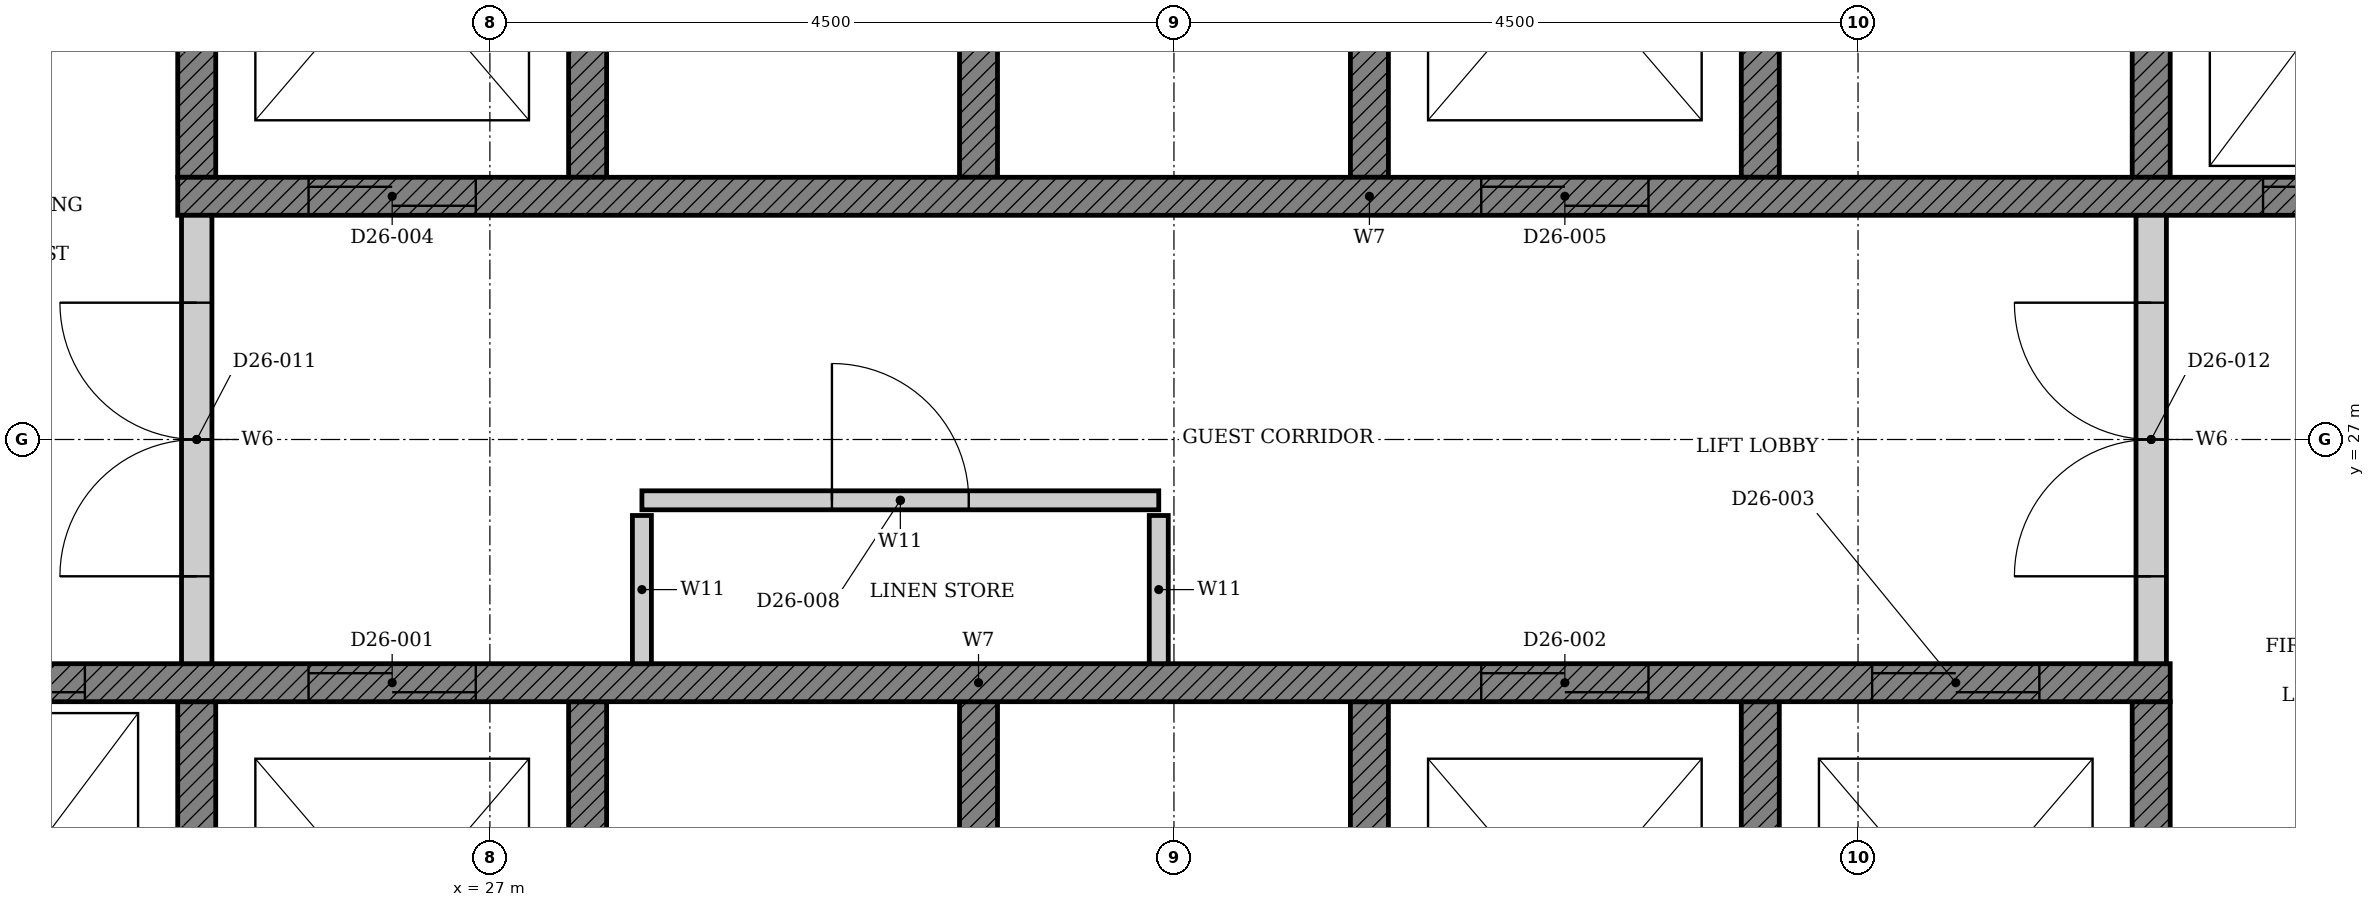
"""IFC4 building model, lengths in metres.
Left out: names, types, materials, properties, quantities, classifications, styles, units other than length and angle.
Written with IfcOpenShell. Run it as: python <this file> out.ifc"""

import sys

from ifc_helpers import new_model, si_unit, direction, frame, frame_2d, origin, place, context, subcontext, project, spatial, polyline, rectangle, outline, extrude, element, fill, save


model = new_model("IFC4")
c1 = context("Model", 3, precision=1e-05, world=origin(), true_north=direction((0.0, 1.0)))
c2 = subcontext(c1, "Body", "Model", "MODEL_VIEW")
j1 = project(units=[si_unit("LENGTHUNIT", "METRE"), si_unit("PLANEANGLEUNIT", "RADIAN")], contexts=[c1])
p1 = place(None, origin())
s1 = spatial("IfcSite", under=j1, at=p1, CompositionType="ELEMENT")
p2 = place(p1, origin())
s2 = spatial("IfcBuilding", under=s1, at=p2, CompositionType="ELEMENT")
p3 = place(p2, frame((0.0, 0.0, 108.0)))
s3 = spatial("IfcBuildingStorey", under=s2, at=p3, CompositionType="ELEMENT", Elevation=108.0)
p4 = place(p3, origin())
e1 = element("IfcWall", 1, at=p4, inside=s3, PredefinedType="SHEAR", context=c2, shape_type="SweptSolid", body=[
    extrude(outline(polyline([(22.375, 22.35), (38.053, 22.35), (38.053, 25.275), (37.803, 25.275), (37.803, 22.65), (35.482, 22.65), (35.482, 25.275), (35.232, 25.275), (35.232, 22.65), (32.911, 22.65), (32.911, 25.275), (32.661, 25.275), (32.661, 22.65), (30.339, 22.65), (30.339, 25.275), (30.089, 25.275), (30.089, 22.65), (27.768, 22.65), (27.768, 25.275), (27.518, 25.275), (27.518, 22.65), (25.197, 22.65), (25.197, 25.275), (24.947, 25.275), (24.947, 22.65), (22.625, 22.65), (22.625, 25.275), (22.375, 25.275), (22.375, 22.35)])), origin(), (0.0, 0.0, 1.0), 3.3),
])
p5 = place(p3, origin())
e2 = element("IfcWall", 2, at=p5, inside=s3, PredefinedType="SHEAR", context=c2, shape_type="SweptSolid", body=[
    extrude(outline(polyline([(24.947, 28.725), (25.197, 28.725), (25.197, 31.35), (27.518, 31.35), (27.518, 28.725), (27.768, 28.725), (27.768, 31.35), (30.089, 31.35), (30.089, 28.725), (30.339, 28.725), (30.339, 31.35), (32.661, 31.35), (32.661, 28.725), (32.911, 28.725), (32.911, 31.35), (35.232, 31.35), (35.232, 28.725), (35.482, 28.725), (35.482, 31.35), (37.803, 31.35), (37.803, 28.725), (38.053, 28.725), (38.053, 31.35), (40.375, 31.35), (40.375, 28.725), (40.625, 28.725), (40.625, 31.65), (24.947, 31.65), (24.947, 28.725)])), origin(), (0.0, 0.0, 1.0), 3.3),
])
p6 = place(p3, frame((22.375, 25.4, 0.0), z_axis=(0.0, 0.0, 1.0), x_axis=(1.0, 0.0, 0.0)))
e3 = element("IfcWall", 3, at=p6, inside=s3, PredefinedType="SHEAR", context=c2, shape_type="SweptSolid", body=[
    extrude(rectangle(XDim=15.678, YDim=0.25, at=frame_2d((7.839, 0.0))), origin(), (0.0, 0.0, 1.0), 3.3),
])
p7 = place(p6, frame((3.432, 0.0, 0.0)))
e4 = element("IfcOpeningElement", 4, at=p7, cuts=e3, PredefinedType="OPENING", context=c2, shape_type="SweptSolid", body=[
    extrude(rectangle(XDim=1.1, YDim=2.1, at=frame_2d((0.55, 1.05))), frame((0.0, 0.135, 0.0), z_axis=(0.0, -1.0, 0.0), x_axis=(1.0, 0.0, 0.0)), (0.0, 0.0, 1.0), 0.27),
])
p8 = place(p6, frame((11.146, 0.0, 0.0)))
e5 = element("IfcOpeningElement", 5, at=p8, cuts=e3, PredefinedType="OPENING", context=c2, shape_type="SweptSolid", body=[
    extrude(rectangle(XDim=1.1, YDim=2.1, at=frame_2d((0.55, 1.05))), frame((0.0, 0.135, 0.0), z_axis=(0.0, -1.0, 0.0), x_axis=(1.0, 0.0, 0.0)), (0.0, 0.0, 1.0), 0.27),
])
p9 = place(p6, frame((13.718, 0.0, 0.0)))
e6 = element("IfcOpeningElement", 6, at=p9, cuts=e3, PredefinedType="OPENING", context=c2, shape_type="SweptSolid", body=[
    extrude(rectangle(XDim=1.1, YDim=2.1, at=frame_2d((0.55, 1.05))), frame((0.0, 0.135, 0.0), z_axis=(0.0, -1.0, 0.0), x_axis=(1.0, 0.0, 0.0)), (0.0, 0.0, 1.0), 0.27),
])
p10 = place(p6, frame((0.861, 0.0, 0.0)))
e7 = element("IfcOpeningElement", 7, at=p10, cuts=e3, PredefinedType="OPENING", context=c2, shape_type="SweptSolid", body=[
    extrude(rectangle(XDim=1.1, YDim=2.1, at=frame_2d((0.55, 1.05))), frame((0.0, 0.135, 0.0), z_axis=(0.0, -1.0, 0.0), x_axis=(1.0, 0.0, 0.0)), (0.0, 0.0, 1.0), 0.27),
])
p11 = place(p3, frame((24.947, 28.6, 0.0), z_axis=(0.0, 0.0, 1.0), x_axis=(1.0, 0.0, 0.0)))
e8 = element("IfcWall", 8, at=p11, inside=s3, PredefinedType="SHEAR", context=c2, shape_type="SweptSolid", body=[
    extrude(rectangle(XDim=15.678, YDim=0.25, at=frame_2d((7.839, 0.0))), origin(), (0.0, 0.0, 1.0), 3.3),
])
p12 = place(p11, frame((0.861, 0.0, 0.0)))
e9 = element("IfcOpeningElement", 9, at=p12, cuts=e8, PredefinedType="OPENING", context=c2, shape_type="SweptSolid", body=[
    extrude(rectangle(XDim=1.1, YDim=2.1, at=frame_2d((0.55, 1.05))), frame((0.0, 0.135, 0.0), z_axis=(0.0, -1.0, 0.0), x_axis=(1.0, 0.0, 0.0)), (0.0, 0.0, 1.0), 0.27),
])
p13 = place(p11, frame((8.575, 0.0, 0.0)))
e10 = element("IfcOpeningElement", 10, at=p13, cuts=e8, PredefinedType="OPENING", context=c2, shape_type="SweptSolid", body=[
    extrude(rectangle(XDim=1.1, YDim=2.1, at=frame_2d((0.55, 1.05))), frame((0.0, 0.135, 0.0), z_axis=(0.0, -1.0, 0.0), x_axis=(1.0, 0.0, 0.0)), (0.0, 0.0, 1.0), 0.27),
])
p14 = place(p11, frame((13.718, 0.0, 0.0)))
e11 = element("IfcOpeningElement", 11, at=p14, cuts=e8, PredefinedType="OPENING", context=c2, shape_type="SweptSolid", body=[
    extrude(rectangle(XDim=1.1, YDim=2.1, at=frame_2d((0.55, 1.05))), frame((0.0, 0.135, 0.0), z_axis=(0.0, -1.0, 0.0), x_axis=(1.0, 0.0, 0.0)), (0.0, 0.0, 1.0), 0.27),
])
p15 = place(p3, frame((28.0, 26.6, 0.0), z_axis=(0.0, 0.0, 1.0), x_axis=(1.0, 0.0, 0.0)))
e12 = element("IfcWall", 12, at=p15, inside=s3, PredefinedType="PARTITIONING", context=c2, shape_type="SweptSolid", body=[
    extrude(rectangle(XDim=3.4, YDim=0.125, at=frame_2d((1.7, 0.0))), origin(), (0.0, 0.0, 1.0), 3.3),
])
p16 = place(p15, frame((1.25, 0.0, 0.0)))
e13 = element("IfcOpeningElement", 13, at=p16, cuts=e12, PredefinedType="OPENING", context=c2, shape_type="SweptSolid", body=[
    extrude(rectangle(XDim=0.9, YDim=2.1, at=frame_2d((0.45, 1.05))), frame((0.0, 0.073, 0.0), z_axis=(0.0, -1.0, 0.0), x_axis=(1.0, 0.0, 0.0)), (0.0, 0.0, 1.0), 0.145),
])
for number, where, z_axis, x_axis in (
    (14, (28.0, 25.525, 0.0), (0.0, 0.0, 1.0), (0.0, 1.0, 0.0)),
    (15, (31.4, 25.525, 0.0), (0.0, 0.0, 1.0), (0.0, 1.0, 0.0)),
):
    element("IfcWall", number, at=place(p3, frame(where, z_axis=z_axis, x_axis=x_axis)), inside=s3, PredefinedType="PARTITIONING", context=c2, shape_type="SweptSolid", body=[
        extrude(rectangle(XDim=0.975, YDim=0.125, at=frame_2d((0.488, 0.0))), origin(), (0.0, 0.0, 1.0), 3.3),
    ])
p17 = place(p3, frame((25.072, 25.525, 0.0), z_axis=(0.0, 0.0, 1.0), x_axis=(0.0, 1.0, 0.0)))
e16 = element("IfcWall", 16, at=p17, inside=s3, PredefinedType="PARTITIONING", context=c2, shape_type="SweptSolid", body=[
    extrude(rectangle(XDim=2.95, YDim=0.2, at=frame_2d((1.475, 0.0))), origin(), (0.0, 0.0, 1.0), 3.3),
])
p18 = place(p17, frame((0.575, 0.0, 0.0)))
e17 = element("IfcOpeningElement", 17, at=p18, cuts=e16, PredefinedType="OPENING", context=c2, shape_type="SweptSolid", body=[
    extrude(rectangle(XDim=1.8, YDim=2.1, at=frame_2d((0.9, 1.05))), frame((0.0, 0.11, 0.0), z_axis=(0.0, -1.0, 0.0), x_axis=(1.0, 0.0, 0.0)), (0.0, 0.0, 1.0), 0.22),
])
p19 = place(p3, frame((37.928, 25.525, 0.0), z_axis=(0.0, 0.0, 1.0), x_axis=(0.0, 1.0, 0.0)))
e18 = element("IfcWall", 18, at=p19, inside=s3, PredefinedType="PARTITIONING", context=c2, shape_type="SweptSolid", body=[
    extrude(rectangle(XDim=2.95, YDim=0.2, at=frame_2d((1.475, 0.0))), origin(), (0.0, 0.0, 1.0), 3.3),
])
p20 = place(p19, frame((0.575, 0.0, 0.0)))
e19 = element("IfcOpeningElement", 19, at=p20, cuts=e18, PredefinedType="OPENING", context=c2, shape_type="SweptSolid", body=[
    extrude(rectangle(XDim=1.8, YDim=2.1, at=frame_2d((0.9, 1.05))), frame((0.0, 0.11, 0.0), z_axis=(0.0, -1.0, 0.0), x_axis=(1.0, 0.0, 0.0)), (0.0, 0.0, 1.0), 0.22),
])
p21 = place(p7, origin())
e20 = element("IfcDoor", 20, at=p21, inside=s3, OperationType="DOUBLE_DOOR_SLIDING", PredefinedType="DOOR", context=c2, shape_type="SweptSolid", body=[
    extrude(rectangle(XDim=1.1, YDim=2.1, at=frame_2d((0.55, 1.05))), frame((0.0, 0.025, 0.0), z_axis=(0.0, -1.0, 0.0), x_axis=(1.0, 0.0, 0.0)), (0.0, 0.0, 1.0), 0.05),
])
fill(e4, e20)
p22 = place(p8, origin())
e21 = element("IfcDoor", 21, at=p22, inside=s3, OperationType="DOUBLE_DOOR_SLIDING", PredefinedType="DOOR", context=c2, shape_type="SweptSolid", body=[
    extrude(rectangle(XDim=1.1, YDim=2.1, at=frame_2d((0.55, 1.05))), frame((0.0, 0.025, 0.0), z_axis=(0.0, -1.0, 0.0), x_axis=(1.0, 0.0, 0.0)), (0.0, 0.0, 1.0), 0.05),
])
fill(e5, e21)
p23 = place(p9, origin())
e22 = element("IfcDoor", 22, at=p23, inside=s3, OperationType="DOUBLE_DOOR_SLIDING", PredefinedType="DOOR", context=c2, shape_type="SweptSolid", body=[
    extrude(rectangle(XDim=1.1, YDim=2.1, at=frame_2d((0.55, 1.05))), frame((0.0, 0.025, 0.0), z_axis=(0.0, -1.0, 0.0), x_axis=(1.0, 0.0, 0.0)), (0.0, 0.0, 1.0), 0.05),
])
fill(e6, e22)
p24 = place(p12, origin())
e23 = element("IfcDoor", 23, at=p24, inside=s3, OperationType="DOUBLE_DOOR_SLIDING", PredefinedType="DOOR", context=c2, shape_type="SweptSolid", body=[
    extrude(rectangle(XDim=1.1, YDim=2.1, at=frame_2d((0.55, 1.05))), frame((0.0, 0.025, 0.0), z_axis=(0.0, -1.0, 0.0), x_axis=(1.0, 0.0, 0.0)), (0.0, 0.0, 1.0), 0.05),
])
fill(e9, e23)
p25 = place(p13, origin())
e24 = element("IfcDoor", 24, at=p25, inside=s3, OperationType="DOUBLE_DOOR_SLIDING", PredefinedType="DOOR", context=c2, shape_type="SweptSolid", body=[
    extrude(rectangle(XDim=1.1, YDim=2.1, at=frame_2d((0.55, 1.05))), frame((0.0, 0.025, 0.0), z_axis=(0.0, -1.0, 0.0), x_axis=(1.0, 0.0, 0.0)), (0.0, 0.0, 1.0), 0.05),
])
fill(e10, e24)
p26 = place(p10, origin())
e25 = element("IfcDoor", 25, at=p26, inside=s3, OperationType="DOUBLE_DOOR_SLIDING", PredefinedType="DOOR", context=c2, shape_type="SweptSolid", body=[
    extrude(rectangle(XDim=1.1, YDim=2.1, at=frame_2d((0.55, 1.05))), frame((0.0, 0.025, 0.0), z_axis=(0.0, -1.0, 0.0), x_axis=(1.0, 0.0, 0.0)), (0.0, 0.0, 1.0), 0.05),
])
fill(e7, e25)
p27 = place(p14, origin())
e26 = element("IfcDoor", 26, at=p27, inside=s3, OperationType="DOUBLE_DOOR_SLIDING", PredefinedType="DOOR", context=c2, shape_type="SweptSolid", body=[
    extrude(rectangle(XDim=1.1, YDim=2.1, at=frame_2d((0.55, 1.05))), frame((0.0, 0.025, 0.0), z_axis=(0.0, -1.0, 0.0), x_axis=(1.0, 0.0, 0.0)), (0.0, 0.0, 1.0), 0.05),
])
fill(e11, e26)
p28 = place(p16, origin())
e27 = element("IfcDoor", 27, at=p28, inside=s3, OperationType="SINGLE_SWING_LEFT", PredefinedType="DOOR", context=c2, shape_type="SweptSolid", body=[
    extrude(rectangle(XDim=0.9, YDim=2.1, at=frame_2d((0.45, 1.05))), frame((0.0, 0.025, 0.0), z_axis=(0.0, -1.0, 0.0), x_axis=(1.0, 0.0, 0.0)), (0.0, 0.0, 1.0), 0.05),
])
fill(e13, e27)
p29 = place(p18, origin())
e28 = element("IfcDoor", 28, at=p29, inside=s3, OperationType="DOUBLE_DOOR_SINGLE_SWING", PredefinedType="DOOR", context=c2, shape_type="SweptSolid", body=[
    extrude(rectangle(XDim=1.8, YDim=2.1, at=frame_2d((0.9, 1.05))), frame((0.0, 0.025, 0.0), z_axis=(0.0, -1.0, 0.0), x_axis=(1.0, 0.0, 0.0)), (0.0, 0.0, 1.0), 0.05),
])
fill(e17, e28)
p30 = place(p20, origin())
e29 = element("IfcDoor", 29, at=p30, inside=s3, OperationType="DOUBLE_DOOR_SINGLE_SWING", PredefinedType="DOOR", context=c2, shape_type="SweptSolid", body=[
    extrude(rectangle(XDim=1.8, YDim=2.1, at=frame_2d((0.9, 1.05))), frame((0.0, 0.025, 0.0), z_axis=(0.0, -1.0, 0.0), x_axis=(1.0, 0.0, 0.0)), (0.0, 0.0, 1.0), 0.05),
])
fill(e19, e29)
save(model, sys.argv[1])
